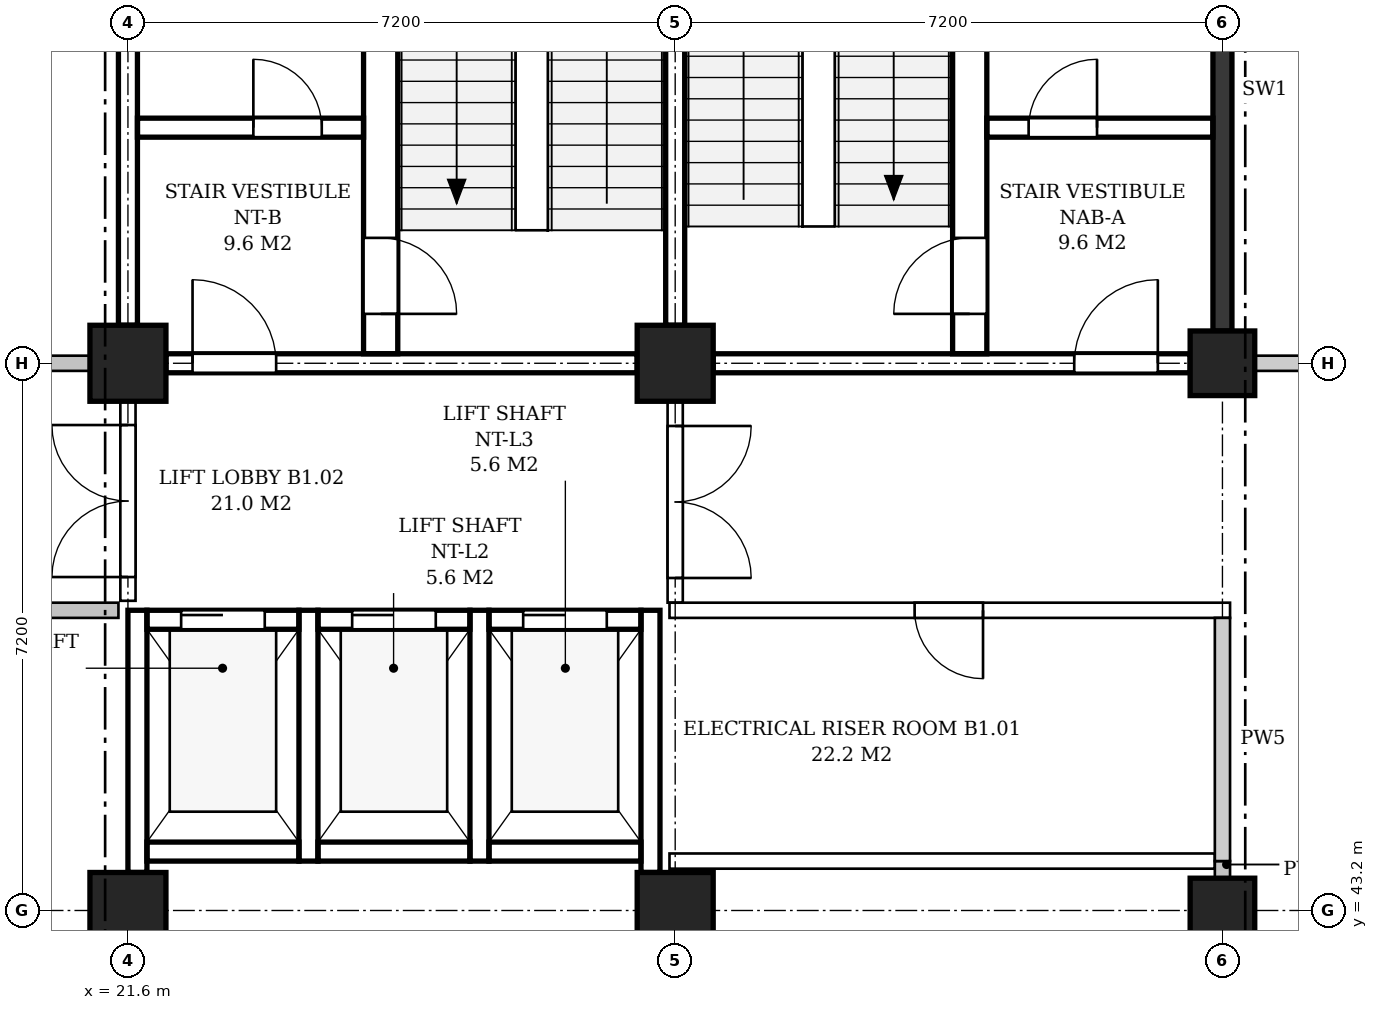
"""IFC4 building model, lengths in metres.
Left out: names, types, materials, properties, quantities, classifications, styles, units other than length and angle.
Written with IfcOpenShell. Run it as: python <this file> out.ifc"""

import sys

from ifc_helpers import new_model, si_unit, direction, frame, frame_2d, origin, origin_2d, place, context, subcontext, project, spatial, polyline, rectangle, outline, extrude, element, fill, save


model = new_model("IFC4")
c1 = context("Model", 3, precision=1e-05, world=origin(), true_north=direction((0.0, 1.0)))
c2 = subcontext(c1, "Body", "Model", "MODEL_VIEW")
j1 = project(units=[si_unit("LENGTHUNIT", "METRE"), si_unit("PLANEANGLEUNIT", "RADIAN")], contexts=[c1])
p1 = place(None, origin())
s1 = spatial("IfcSite", under=j1, at=p1, CompositionType="ELEMENT")
p2 = place(p1, origin())
s2 = spatial("IfcBuilding", under=s1, at=p2, CompositionType="ELEMENT")
p3 = place(p2, frame((0.0, 0.0, -4.5)))
s3 = spatial("IfcBuildingStorey", under=s2, at=p3, CompositionType="ELEMENT", Elevation=-4.5)
for number, where, z_axis, x_axis in (
    (1, (21.6, 43.2, 0.0), (0.0, 0.0, 1.0), (1.0, 0.0, 0.0)),
    (2, (21.6, 50.4, 0.0), (0.0, 0.0, 1.0), (1.0, 0.0, 0.0)),
    (3, (28.8, 43.2, 0.0), (0.0, 0.0, 1.0), (1.0, 0.0, 0.0)),
    (4, (28.8, 50.4, 0.0), (0.0, 0.0, 1.0), (1.0, 0.0, 0.0)),
):
    element("IfcColumn", number, at=place(p3, frame(where, z_axis=z_axis, x_axis=x_axis)), inside=s3, PredefinedType="COLUMN", context=c2, shape_type="SweptSolid", body=[
        extrude(rectangle(XDim=1.0, YDim=1.0, at=origin_2d()), origin(), (0.0, 0.0, 1.0), 4.5),
    ])
for number, where, z_axis, x_axis in (
    (5, (36.0, 43.2, 0.0), (0.0, 0.0, 1.0), (1.0, 0.0, 0.0)),
    (6, (36.0, 50.4, 0.0), (0.0, 0.0, 1.0), (1.0, 0.0, 0.0)),
):
    element("IfcColumn", number, at=place(p3, frame(where, z_axis=z_axis, x_axis=x_axis)), inside=s3, PredefinedType="COLUMN", context=c2, shape_type="SweptSolid", body=[
        extrude(rectangle(XDim=0.85, YDim=0.85, at=origin_2d()), origin(), (0.0, 0.0, 1.0), 4.5),
    ])
p4 = place(p3, frame((29.3, 50.4, 0.0), z_axis=(0.0, 0.0, 1.0), x_axis=(1.0, 0.0, 0.0)))
e7 = element("IfcWall", 7, at=p4, inside=s3, PredefinedType="SHEAR", context=c2, shape_type="SweptSolid", body=[
    extrude(rectangle(XDim=6.275, YDim=0.25, at=frame_2d((3.137, 0.0))), origin(), (0.0, 0.0, 1.0), 3.4),
])
p5 = place(p4, frame((4.75, 0.0, 0.0)))
e8 = element("IfcOpeningElement", 8, at=p5, cuts=e7, PredefinedType="OPENING", context=c2, shape_type="SweptSolid", body=[
    extrude(rectangle(XDim=1.1, YDim=2.1, at=frame_2d((0.55, 1.05))), frame((0.0, 0.135, 0.0), z_axis=(0.0, -1.0, 0.0), x_axis=(1.0, 0.0, 0.0)), (0.0, 0.0, 1.0), 0.27),
])
p6 = place(p3, frame((28.8, 50.9, 0.0), z_axis=(0.0, 0.0, 1.0), x_axis=(0.0, 1.0, 0.0)))
e9 = element("IfcWall", 9, at=p6, inside=s3, PredefinedType="SHEAR", context=c2, shape_type="SweptSolid", body=[
    extrude(rectangle(XDim=6.2, YDim=0.25, at=frame_2d((3.1, 0.0))), origin(), (0.0, 0.0, 1.0), 3.4),
])
p7 = place(p3, frame((36.0, 50.825, 0.0), z_axis=(0.0, 0.0, 1.0), x_axis=(0.0, 1.0, 0.0)))
e10 = element("IfcWall", 10, at=p7, inside=s3, PredefinedType="SHEAR", context=c2, shape_type="SweptSolid", body=[
    extrude(rectangle(XDim=6.35, YDim=0.25, at=frame_2d((3.175, 0.0))), origin(), (0.0, 0.0, 1.0), 3.4),
])
p8 = place(p3, frame((32.675, 50.525, 0.0), z_axis=(0.0, 0.0, 1.0), x_axis=(0.0, 1.0, 0.0)))
e11 = element("IfcWall", 11, at=p8, inside=s3, PredefinedType="SHEAR", context=c2, shape_type="SweptSolid", body=[
    extrude(rectangle(XDim=6.875, YDim=0.45, at=frame_2d((3.438, 0.0))), origin(), (0.0, 0.0, 1.0), 4.2),
])
p9 = place(p8, frame((0.525, 0.0, 0.0)))
e12 = element("IfcOpeningElement", 12, at=p9, cuts=e11, PredefinedType="OPENING", context=c2, shape_type="SweptSolid", body=[
    extrude(rectangle(XDim=1.0, YDim=2.1, at=frame_2d((0.5, 1.05))), frame((0.0, 0.235, 0.0), z_axis=(0.0, -1.0, 0.0), x_axis=(1.0, 0.0, 0.0)), (0.0, 0.0, 1.0), 0.47),
])
p10 = place(p3, frame((32.9, 53.5, 0.0), z_axis=(0.0, 0.0, 1.0), x_axis=(1.0, 0.0, 0.0)))
e13 = element("IfcWall", 13, at=p10, inside=s3, PredefinedType="SHEAR", context=c2, shape_type="SweptSolid", body=[
    extrude(rectangle(XDim=2.975, YDim=0.25, at=frame_2d((1.488, 0.0))), origin(), (0.0, 0.0, 1.0), 4.2),
])
p11 = place(p10, frame((0.55, 0.0, 0.0)))
e14 = element("IfcOpeningElement", 14, at=p11, cuts=e13, PredefinedType="OPENING", context=c2, shape_type="SweptSolid", body=[
    extrude(rectangle(XDim=0.9, YDim=2.1, at=frame_2d((0.45, 1.05))), frame((0.0, 0.135, 0.0), z_axis=(0.0, -1.0, 0.0), x_axis=(1.0, 0.0, 0.0)), (0.0, 0.0, 1.0), 0.27),
])
p12 = place(p3, frame((22.1, 50.4, 0.0), z_axis=(0.0, 0.0, 1.0), x_axis=(1.0, 0.0, 0.0)))
e15 = element("IfcWall", 15, at=p12, inside=s3, PredefinedType="SHEAR", context=c2, shape_type="SweptSolid", body=[
    extrude(rectangle(XDim=6.2, YDim=0.25, at=frame_2d((3.1, 0.0))), origin(), (0.0, 0.0, 1.0), 3.4),
])
p13 = place(p12, frame((0.35, 0.0, 0.0)))
e16 = element("IfcOpeningElement", 16, at=p13, cuts=e15, PredefinedType="OPENING", context=c2, shape_type="SweptSolid", body=[
    extrude(rectangle(XDim=1.1, YDim=2.1, at=frame_2d((0.55, 1.05))), frame((0.0, 0.135, 0.0), z_axis=(0.0, -1.0, 0.0), x_axis=(1.0, 0.0, 0.0)), (0.0, 0.0, 1.0), 0.27),
])
p14 = place(p3, frame((21.6, 50.9, 0.0), z_axis=(0.0, 0.0, 1.0), x_axis=(0.0, 1.0, 0.0)))
e17 = element("IfcWall", 17, at=p14, inside=s3, PredefinedType="SHEAR", context=c2, shape_type="SweptSolid", body=[
    extrude(rectangle(XDim=6.2, YDim=0.25, at=frame_2d((3.1, 0.0))), origin(), (0.0, 0.0, 1.0), 3.4),
])
p15 = place(p3, frame((24.925, 50.525, 0.0), z_axis=(0.0, 0.0, 1.0), x_axis=(0.0, 1.0, 0.0)))
e18 = element("IfcWall", 18, at=p15, inside=s3, PredefinedType="SHEAR", context=c2, shape_type="SweptSolid", body=[
    extrude(rectangle(XDim=6.875, YDim=0.45, at=frame_2d((3.438, 0.0))), origin(), (0.0, 0.0, 1.0), 4.2),
])
p16 = place(p15, frame((0.525, 0.0, 0.0)))
e19 = element("IfcOpeningElement", 19, at=p16, cuts=e18, PredefinedType="OPENING", context=c2, shape_type="SweptSolid", body=[
    extrude(rectangle(XDim=1.0, YDim=2.1, at=frame_2d((0.5, 1.05))), frame((0.0, 0.235, 0.0), z_axis=(0.0, -1.0, 0.0), x_axis=(1.0, 0.0, 0.0)), (0.0, 0.0, 1.0), 0.47),
])
p17 = place(p3, frame((21.725, 53.5, 0.0), z_axis=(0.0, 0.0, 1.0), x_axis=(1.0, 0.0, 0.0)))
e20 = element("IfcWall", 20, at=p17, inside=s3, PredefinedType="SHEAR", context=c2, shape_type="SweptSolid", body=[
    extrude(rectangle(XDim=2.975, YDim=0.25, at=frame_2d((1.487, 0.0))), origin(), (0.0, 0.0, 1.0), 4.2),
])
p18 = place(p17, frame((1.525, 0.0, 0.0)))
e21 = element("IfcOpeningElement", 21, at=p18, cuts=e20, PredefinedType="OPENING", context=c2, shape_type="SweptSolid", body=[
    extrude(rectangle(XDim=0.9, YDim=2.1, at=frame_2d((0.45, 1.05))), frame((0.0, 0.135, 0.0), z_axis=(0.0, -1.0, 0.0), x_axis=(1.0, 0.0, 0.0)), (0.0, 0.0, 1.0), 0.27),
])
p19 = place(p3, frame((21.725, 43.7, -1.6), z_axis=(0.0, 0.0, 1.0), x_axis=(0.0, 1.0, 0.0)))
e22 = element("IfcWall", 22, at=p19, inside=s3, PredefinedType="SHEAR", context=c2, shape_type="SweptSolid", body=[
    extrude(rectangle(XDim=3.45, YDim=0.25, at=frame_2d((1.725, 0.0))), origin(), (0.0, 0.0, 1.0), 5.0),
])
for number, where, z_axis, x_axis in (
    (23, (23.975, 43.85, -1.6), (0.0, 0.0, 1.0), (0.0, 1.0, 0.0)),
    (24, (26.225, 43.85, -1.6), (0.0, 0.0, 1.0), (0.0, 1.0, 0.0)),
):
    element("IfcWall", number, at=place(p3, frame(where, z_axis=z_axis, x_axis=x_axis)), inside=s3, PredefinedType="SHEAR", context=c2, shape_type="SweptSolid", body=[
        extrude(rectangle(XDim=3.3, YDim=0.25, at=frame_2d((1.65, 0.0))), origin(), (0.0, 0.0, 1.0), 5.8),
    ])
p20 = place(p3, frame((28.475, 43.7, -1.6), z_axis=(0.0, 0.0, 1.0), x_axis=(0.0, 1.0, 0.0)))
e25 = element("IfcWall", 25, at=p20, inside=s3, PredefinedType="SHEAR", context=c2, shape_type="SweptSolid", body=[
    extrude(rectangle(XDim=3.45, YDim=0.25, at=frame_2d((1.725, 0.0))), origin(), (0.0, 0.0, 1.0), 5.8),
])
p21 = place(p3, frame((21.85, 47.025, 0.0), z_axis=(0.0, 0.0, 1.0), x_axis=(1.0, 0.0, 0.0)))
e26 = element("IfcWall", 26, at=p21, inside=s3, PredefinedType="SHEAR", context=c2, shape_type="SweptSolid", body=[
    extrude(rectangle(XDim=2.0, YDim=0.25, at=frame_2d((1.0, 0.0))), origin(), (0.0, 0.0, 1.0), 4.2),
])
p22 = place(p21, frame((0.45, 0.0, 0.0)))
e27 = element("IfcOpeningElement", 27, at=p22, cuts=e26, PredefinedType="OPENING", context=c2, shape_type="SweptSolid", body=[
    extrude(rectangle(XDim=1.1, YDim=2.1, at=frame_2d((0.55, 1.05))), frame((0.0, 0.135, 0.0), z_axis=(0.0, -1.0, 0.0), x_axis=(1.0, 0.0, 0.0)), (0.0, 0.0, 1.0), 0.27),
])
p23 = place(p3, frame((21.85, 43.975, -1.6), z_axis=(0.0, 0.0, 1.0), x_axis=(1.0, 0.0, 0.0)))
e28 = element("IfcWall", 28, at=p23, inside=s3, PredefinedType="SHEAR", context=c2, shape_type="SweptSolid", body=[
    extrude(rectangle(XDim=2.0, YDim=0.25, at=frame_2d((1.0, 0.0))), origin(), (0.0, 0.0, 1.0), 5.8),
])
p24 = place(p3, frame((24.1, 47.025, 0.0), z_axis=(0.0, 0.0, 1.0), x_axis=(1.0, 0.0, 0.0)))
e29 = element("IfcWall", 29, at=p24, inside=s3, PredefinedType="SHEAR", context=c2, shape_type="SweptSolid", body=[
    extrude(rectangle(XDim=2.0, YDim=0.25, at=frame_2d((1.0, 0.0))), origin(), (0.0, 0.0, 1.0), 4.2),
])
p25 = place(p24, frame((0.45, 0.0, 0.0)))
e30 = element("IfcOpeningElement", 30, at=p25, cuts=e29, PredefinedType="OPENING", context=c2, shape_type="SweptSolid", body=[
    extrude(rectangle(XDim=1.1, YDim=2.1, at=frame_2d((0.55, 1.05))), frame((0.0, 0.135, 0.0), z_axis=(0.0, -1.0, 0.0), x_axis=(1.0, 0.0, 0.0)), (0.0, 0.0, 1.0), 0.27),
])
p26 = place(p3, frame((24.1, 43.975, -1.6), z_axis=(0.0, 0.0, 1.0), x_axis=(1.0, 0.0, 0.0)))
e31 = element("IfcWall", 31, at=p26, inside=s3, PredefinedType="SHEAR", context=c2, shape_type="SweptSolid", body=[
    extrude(rectangle(XDim=2.0, YDim=0.25, at=frame_2d((1.0, 0.0))), origin(), (0.0, 0.0, 1.0), 5.8),
])
p27 = place(p3, frame((26.35, 47.025, 0.0), z_axis=(0.0, 0.0, 1.0), x_axis=(1.0, 0.0, 0.0)))
e32 = element("IfcWall", 32, at=p27, inside=s3, PredefinedType="SHEAR", context=c2, shape_type="SweptSolid", body=[
    extrude(rectangle(XDim=2.0, YDim=0.25, at=frame_2d((1.0, 0.0))), origin(), (0.0, 0.0, 1.0), 4.2),
])
p28 = place(p27, frame((0.45, 0.0, 0.0)))
e33 = element("IfcOpeningElement", 33, at=p28, cuts=e32, PredefinedType="OPENING", context=c2, shape_type="SweptSolid", body=[
    extrude(rectangle(XDim=1.1, YDim=2.1, at=frame_2d((0.55, 1.05))), frame((0.0, 0.135, 0.0), z_axis=(0.0, -1.0, 0.0), x_axis=(1.0, 0.0, 0.0)), (0.0, 0.0, 1.0), 0.27),
])
p29 = place(p3, frame((26.35, 43.975, -1.6), z_axis=(0.0, 0.0, 1.0), x_axis=(1.0, 0.0, 0.0)))
e34 = element("IfcWall", 34, at=p29, inside=s3, PredefinedType="SHEAR", context=c2, shape_type="SweptSolid", body=[
    extrude(rectangle(XDim=2.0, YDim=0.25, at=frame_2d((1.0, 0.0))), origin(), (0.0, 0.0, 1.0), 5.8),
])
p30 = place(p3, frame((28.725, 43.85, 0.0), z_axis=(0.0, 0.0, 1.0), x_axis=(1.0, 0.0, 0.0)))
e35 = element("IfcWall", 35, at=p30, inside=s3, PredefinedType="SOLIDWALL", context=c2, shape_type="SweptSolid", body=[
    extrude(outline(polyline([(0.0, 0.0), (7.175, 0.0), (7.175, 3.4), (6.975, 3.4), (6.975, 4.2), (0.375, 4.2), (0.375, 3.4), (0.0, 3.4), (0.0, 0.0)])), frame((0.0, 0.1, 0.0), z_axis=(0.0, -1.0, 0.0), x_axis=(1.0, 0.0, 0.0)), (0.0, 0.0, 1.0), 0.2),
])
p31 = place(p3, frame((3.5, 47.15, 0.0), z_axis=(0.0, 0.0, 1.0), x_axis=(1.0, 0.0, 0.0)))
e36 = element("IfcWall", 36, at=p31, inside=s3, PredefinedType="PARTITIONING", context=c2, shape_type="SweptSolid", body=[
    extrude(outline(polyline([(0.0, 0.0), (17.975, 0.0), (17.975, 3.4), (17.8, 3.4), (17.8, 4.2), (11.2, 4.2), (11.2, 3.4), (10.6, 3.4), (10.6, 4.2), (4.0, 4.2), (4.0, 3.4), (3.4, 3.4), (3.4, 4.2), (0.0, 4.2), (0.0, 0.0)])), frame((0.0, 0.1, 0.0), z_axis=(0.0, -1.0, 0.0), x_axis=(1.0, 0.0, 0.0)), (0.0, 0.0, 1.0), 0.2),
])
p32 = place(p31, frame((13.938, 0.0, 0.0)))
e37 = element("IfcOpeningElement", 37, at=p32, cuts=e36, PredefinedType="OPENING", context=c2, shape_type="SweptSolid", body=[
    extrude(rectangle(XDim=1.0, YDim=2.1, at=frame_2d((0.5, 1.05))), frame((0.0, 0.11, 0.0), z_axis=(0.0, -1.0, 0.0), x_axis=(1.0, 0.0, 0.0)), (0.0, 0.0, 1.0), 0.22),
])
p33 = place(p3, frame((28.725, 47.15, 0.0), z_axis=(0.0, 0.0, 1.0), x_axis=(1.0, 0.0, 0.0)))
e38 = element("IfcWall", 38, at=p33, inside=s3, PredefinedType="SOLIDWALL", context=c2, shape_type="SweptSolid", body=[
    extrude(outline(polyline([(0.0, 0.0), (7.375, 0.0), (7.375, 3.4), (6.975, 3.4), (6.975, 4.2), (0.375, 4.2), (0.375, 3.4), (0.0, 3.4), (0.0, 0.0)])), frame((0.0, 0.1, 0.0), z_axis=(0.0, -1.0, 0.0), x_axis=(1.0, 0.0, 0.0)), (0.0, 0.0, 1.0), 0.2),
])
p34 = place(p33, frame((3.225, 0.0, 0.0)))
e39 = element("IfcOpeningElement", 39, at=p34, cuts=e38, PredefinedType="OPENING", context=c2, shape_type="SweptSolid", body=[
    extrude(rectangle(XDim=0.9, YDim=2.1, at=frame_2d((0.45, 1.05))), frame((0.0, 0.11, 0.0), z_axis=(0.0, -1.0, 0.0), x_axis=(1.0, 0.0, 0.0)), (0.0, 0.0, 1.0), 0.22),
])
p35 = place(p3, frame((14.9, 50.4, 0.0), z_axis=(0.0, 0.0, 1.0), x_axis=(1.0, 0.0, 0.0)))
e40 = element("IfcWall", 40, at=p35, inside=s3, PredefinedType="PARTITIONING", context=c2, shape_type="SweptSolid", body=[
    extrude(rectangle(XDim=6.2, YDim=0.2, at=frame_2d((3.1, 0.0))), origin(), (0.0, 0.0, 1.0), 3.4),
])
p36 = place(p35, frame((2.6, 0.0, 0.0)))
e41 = element("IfcOpeningElement", 41, at=p36, cuts=e40, PredefinedType="OPENING", context=c2, shape_type="SweptSolid", body=[
    extrude(rectangle(XDim=1.0, YDim=2.1, at=frame_2d((0.5, 1.05))), frame((0.0, 0.11, 0.0), z_axis=(0.0, -1.0, 0.0), x_axis=(1.0, 0.0, 0.0)), (0.0, 0.0, 1.0), 0.22),
])
p37 = place(p3, frame((36.425, 50.4, 0.0), z_axis=(0.0, 0.0, 1.0), x_axis=(1.0, 0.0, 0.0)))
e42 = element("IfcWall", 42, at=p37, inside=s3, PredefinedType="SOLIDWALL", context=c2, shape_type="SweptSolid", body=[
    extrude(rectangle(XDim=6.35, YDim=0.2, at=frame_2d((3.175, 0.0))), origin(), (0.0, 0.0, 1.0), 3.4),
])
p38 = place(p3, frame((21.6, 47.275, 0.0), z_axis=(0.0, 0.0, 1.0), x_axis=(0.0, 1.0, 0.0)))
e43 = element("IfcWall", 43, at=p38, inside=s3, PredefinedType="PARTITIONING", context=c2, shape_type="SweptSolid", body=[
    extrude(rectangle(XDim=2.625, YDim=0.2, at=frame_2d((1.312, 0.0))), origin(), (0.0, 0.0, 1.0), 3.4),
])
p39 = place(p38, frame((0.312, 0.0, 0.0)))
e44 = element("IfcOpeningElement", 44, at=p39, cuts=e43, PredefinedType="OPENING", context=c2, shape_type="SweptSolid", body=[
    extrude(rectangle(XDim=2.0, YDim=2.4, at=frame_2d((1.0, 1.2))), frame((0.0, 0.11, 0.0), z_axis=(0.0, -1.0, 0.0), x_axis=(1.0, 0.0, 0.0)), (0.0, 0.0, 1.0), 0.22),
])
p40 = place(p3, frame((28.8, 47.25, 0.0), z_axis=(0.0, 0.0, 1.0), x_axis=(0.0, 1.0, 0.0)))
e45 = element("IfcWall", 45, at=p40, inside=s3, PredefinedType="PARTITIONING", context=c2, shape_type="SweptSolid", body=[
    extrude(rectangle(XDim=2.65, YDim=0.2, at=frame_2d((1.325, 0.0))), origin(), (0.0, 0.0, 1.0), 3.4),
])
p41 = place(p40, frame((0.325, 0.0, 0.0)))
e46 = element("IfcOpeningElement", 46, at=p41, cuts=e45, PredefinedType="OPENING", context=c2, shape_type="SweptSolid", body=[
    extrude(rectangle(XDim=2.0, YDim=2.4, at=frame_2d((1.0, 1.2))), frame((0.0, 0.11, 0.0), z_axis=(0.0, -1.0, 0.0), x_axis=(1.0, 0.0, 0.0)), (0.0, 0.0, 1.0), 0.22),
])
p42 = place(p3, frame((36.0, 43.625, 0.0), z_axis=(0.0, 0.0, 1.0), x_axis=(0.0, 1.0, 0.0)))
e47 = element("IfcWall", 47, at=p42, inside=s3, PredefinedType="PARTITIONING", context=c2, shape_type="SweptSolid", body=[
    extrude(rectangle(XDim=0.225, YDim=0.2, at=frame_2d((0.113, 0.0))), origin(), (0.0, 0.0, 1.0), 3.4),
])
p43 = place(p3, frame((36.0, 43.85, 0.0), z_axis=(0.0, 0.0, 1.0), x_axis=(0.0, 1.0, 0.0)))
e48 = element("IfcWall", 48, at=p43, inside=s3, PredefinedType="SOLIDWALL", context=c2, shape_type="SweptSolid", body=[
    extrude(rectangle(XDim=3.2, YDim=0.2, at=frame_2d((1.6, 0.0))), origin(), (0.0, 0.0, 1.0), 3.4),
])
p44 = place(p9, origin())
e49 = element("IfcDoor", 49, at=p44, inside=s3, OperationType="SINGLE_SWING_LEFT", PredefinedType="DOOR", context=c2, shape_type="SweptSolid", body=[
    extrude(rectangle(XDim=1.0, YDim=2.1, at=frame_2d((0.5, 1.05))), frame((0.0, 0.025, 0.0), z_axis=(0.0, -1.0, 0.0), x_axis=(1.0, 0.0, 0.0)), (0.0, 0.0, 1.0), 0.05),
])
fill(e12, e49)
p45 = place(p5, origin())
e50 = element("IfcDoor", 50, at=p45, inside=s3, OperationType="SINGLE_SWING_RIGHT", PredefinedType="DOOR", context=c2, shape_type="SweptSolid", body=[
    extrude(rectangle(XDim=1.1, YDim=2.1, at=frame_2d((0.55, 1.05))), frame((0.0, 0.025, 0.0), z_axis=(0.0, -1.0, 0.0), x_axis=(1.0, 0.0, 0.0)), (0.0, 0.0, 1.0), 0.05),
])
fill(e8, e50)
p46 = place(p11, origin())
e51 = element("IfcDoor", 51, at=p46, inside=s3, OperationType="SINGLE_SWING_RIGHT", PredefinedType="DOOR", context=c2, shape_type="SweptSolid", body=[
    extrude(rectangle(XDim=0.9, YDim=2.1, at=frame_2d((0.45, 1.05))), frame((0.0, 0.025, 0.0), z_axis=(0.0, -1.0, 0.0), x_axis=(1.0, 0.0, 0.0)), (0.0, 0.0, 1.0), 0.05),
])
fill(e14, e51)
p47 = place(p16, frame((1.0, 0.0, 0.0), z_axis=(0.0, 0.0, 1.0), x_axis=(-1.0, 0.0, 0.0)))
e52 = element("IfcDoor", 52, at=p47, inside=s3, OperationType="SINGLE_SWING_RIGHT", PredefinedType="DOOR", context=c2, shape_type="SweptSolid", body=[
    extrude(rectangle(XDim=1.0, YDim=2.1, at=frame_2d((0.5, 1.05))), frame((0.0, 0.025, 0.0), z_axis=(0.0, -1.0, 0.0), x_axis=(1.0, 0.0, 0.0)), (0.0, 0.0, 1.0), 0.05),
])
fill(e19, e52)
p48 = place(p13, origin())
e53 = element("IfcDoor", 53, at=p48, inside=s3, OperationType="SINGLE_SWING_LEFT", PredefinedType="DOOR", context=c2, shape_type="SweptSolid", body=[
    extrude(rectangle(XDim=1.1, YDim=2.1, at=frame_2d((0.55, 1.05))), frame((0.0, 0.025, 0.0), z_axis=(0.0, -1.0, 0.0), x_axis=(1.0, 0.0, 0.0)), (0.0, 0.0, 1.0), 0.05),
])
fill(e16, e53)
p49 = place(p18, origin())
e54 = element("IfcDoor", 54, at=p49, inside=s3, OperationType="SINGLE_SWING_LEFT", PredefinedType="DOOR", context=c2, shape_type="SweptSolid", body=[
    extrude(rectangle(XDim=0.9, YDim=2.1, at=frame_2d((0.45, 1.05))), frame((0.0, 0.025, 0.0), z_axis=(0.0, -1.0, 0.0), x_axis=(1.0, 0.0, 0.0)), (0.0, 0.0, 1.0), 0.05),
])
fill(e21, e54)
p50 = place(p22, origin())
e55 = element("IfcDoor", 55, at=p50, inside=s3, OperationType="SLIDING_TO_LEFT", PredefinedType="DOOR", context=c2, shape_type="SweptSolid", body=[
    extrude(rectangle(XDim=1.1, YDim=2.1, at=frame_2d((0.55, 1.05))), frame((0.0, 0.025, 0.0), z_axis=(0.0, -1.0, 0.0), x_axis=(1.0, 0.0, 0.0)), (0.0, 0.0, 1.0), 0.05),
])
fill(e27, e55)
p51 = place(p25, origin())
e56 = element("IfcDoor", 56, at=p51, inside=s3, OperationType="SLIDING_TO_LEFT", PredefinedType="DOOR", context=c2, shape_type="SweptSolid", body=[
    extrude(rectangle(XDim=1.1, YDim=2.1, at=frame_2d((0.55, 1.05))), frame((0.0, 0.025, 0.0), z_axis=(0.0, -1.0, 0.0), x_axis=(1.0, 0.0, 0.0)), (0.0, 0.0, 1.0), 0.05),
])
fill(e30, e56)
p52 = place(p28, origin())
e57 = element("IfcDoor", 57, at=p52, inside=s3, OperationType="SLIDING_TO_LEFT", PredefinedType="DOOR", context=c2, shape_type="SweptSolid", body=[
    extrude(rectangle(XDim=1.1, YDim=2.1, at=frame_2d((0.55, 1.05))), frame((0.0, 0.025, 0.0), z_axis=(0.0, -1.0, 0.0), x_axis=(1.0, 0.0, 0.0)), (0.0, 0.0, 1.0), 0.05),
])
fill(e33, e57)
p53 = place(p39, origin())
e58 = element("IfcDoor", 58, at=p53, inside=s3, OperationType="DOUBLE_DOOR_SINGLE_SWING", PredefinedType="DOOR", context=c2, shape_type="SweptSolid", body=[
    extrude(rectangle(XDim=2.0, YDim=2.4, at=frame_2d((1.0, 1.2))), frame((0.0, 0.025, 0.0), z_axis=(0.0, -1.0, 0.0), x_axis=(1.0, 0.0, 0.0)), (0.0, 0.0, 1.0), 0.05),
])
fill(e44, e58)
p54 = place(p41, origin())
e59 = element("IfcDoor", 59, at=p54, inside=s3, OperationType="DOUBLE_DOOR_SINGLE_SWING", PredefinedType="DOOR", context=c2, shape_type="SweptSolid", body=[
    extrude(rectangle(XDim=2.0, YDim=2.4, at=frame_2d((1.0, 1.2))), frame((0.0, 0.025, 0.0), z_axis=(0.0, -1.0, 0.0), x_axis=(1.0, 0.0, 0.0)), (0.0, 0.0, 1.0), 0.05),
])
fill(e46, e59)
p55 = place(p34, frame((0.9, 0.0, 0.0), z_axis=(0.0, 0.0, 1.0), x_axis=(-1.0, 0.0, 0.0)))
e60 = element("IfcDoor", 60, at=p55, inside=s3, OperationType="SINGLE_SWING_LEFT", PredefinedType="DOOR", context=c2, shape_type="SweptSolid", body=[
    extrude(rectangle(XDim=0.9, YDim=2.1, at=frame_2d((0.45, 1.05))), frame((0.0, 0.025, 0.0), z_axis=(0.0, -1.0, 0.0), x_axis=(1.0, 0.0, 0.0)), (0.0, 0.0, 1.0), 0.05),
])
fill(e39, e60)
save(model, sys.argv[1])
